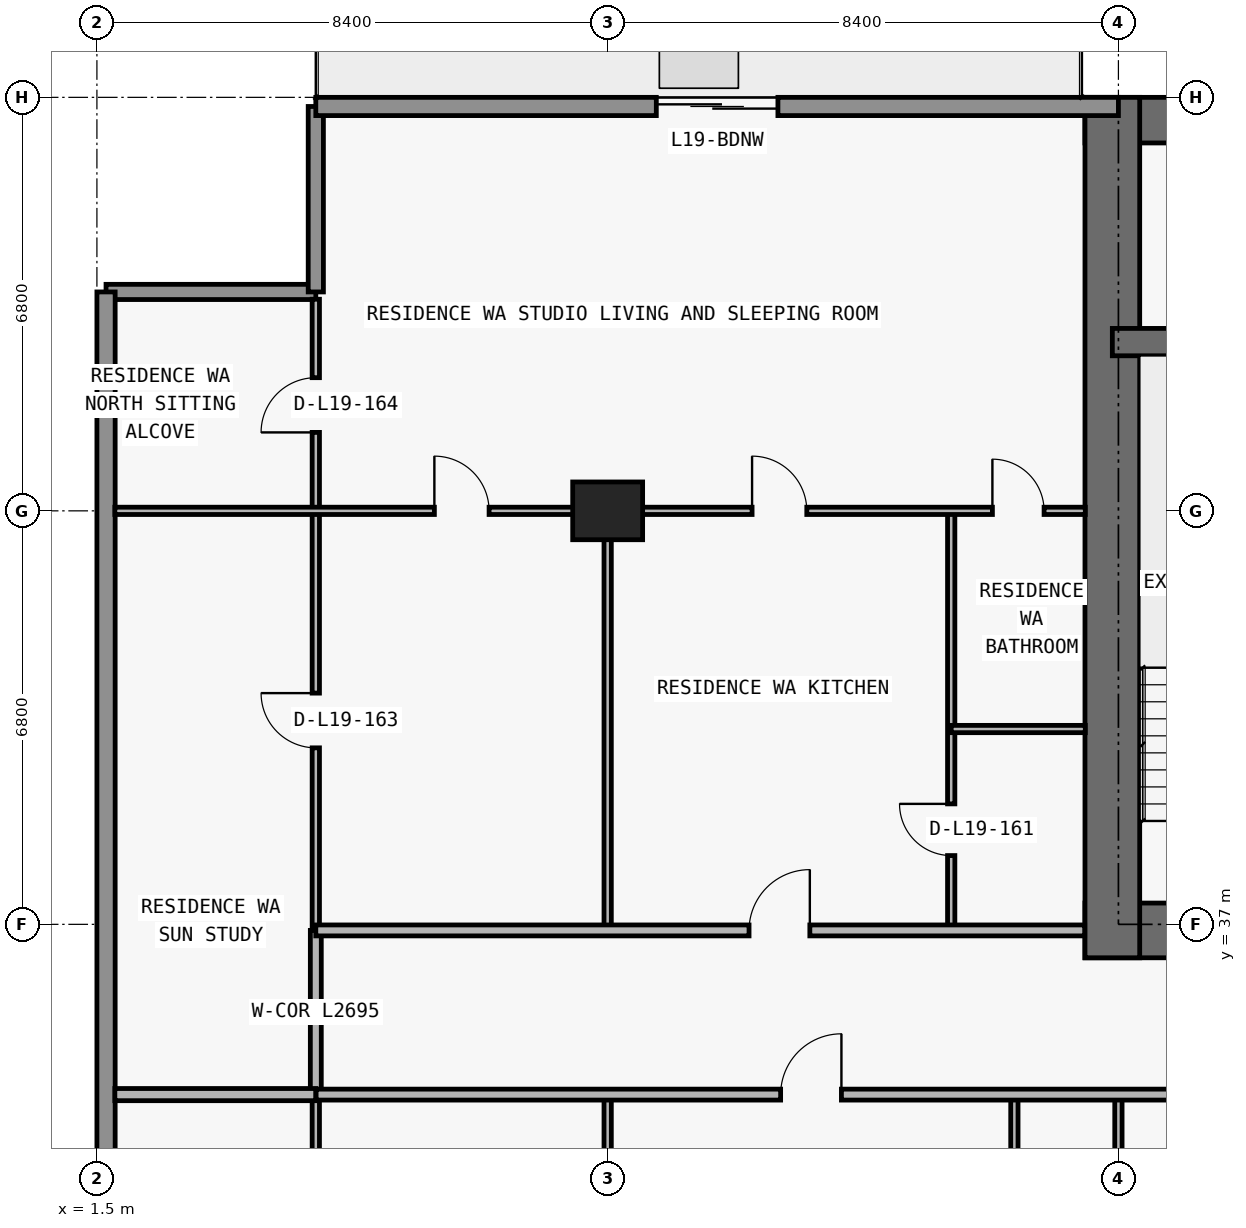
"""IFC4 building model, lengths in metres.
Left out: names, types, materials, properties, quantities, classifications, styles, units other than length and angle.
Written with IfcOpenShell. Run it as: python <this file> out.ifc"""

import sys

from ifc_helpers import new_model, si_unit, direction, frame, frame_2d, origin, origin_2d, place, context, subcontext, project, spatial, rectangle, extrude, element, fill, save


model = new_model("IFC4")
c1 = context("Model", 3, precision=1e-05, world=origin(), true_north=direction((0.0, 1.0)))
c2 = subcontext(c1, "Body", "Model", "MODEL_VIEW")
j1 = project(units=[si_unit("LENGTHUNIT", "METRE"), si_unit("PLANEANGLEUNIT", "RADIAN")], contexts=[c1])
p1 = place(None, origin())
s1 = spatial("IfcSite", under=j1, at=p1, CompositionType="ELEMENT")
p2 = place(p1, origin())
s2 = spatial("IfcBuilding", under=s1, at=p2, CompositionType="ELEMENT")
p3 = place(p2, frame((0.0, 0.0, 72.9)))
s3 = spatial("IfcBuildingStorey", under=s2, at=p3, CompositionType="ELEMENT", Elevation=72.9)
p4 = place(p3, frame((9.9, 43.8, 0.0), z_axis=(0.0, 0.0, 1.0), x_axis=(1.0, 0.0, 0.0)))
e1 = element("IfcColumn", 1, at=p4, inside=s3, PredefinedType="COLUMN", context=c2, shape_type="SweptSolid", body=[
    extrude(rectangle(XDim=1.15, YDim=0.95, at=origin_2d()), origin(), (0.0, 0.0, 1.0), 3.05),
])
p5 = place(p3, frame((17.75, 36.9, 0.0), z_axis=(0.0, 0.0, 1.0), x_axis=(1.0, 0.0, 0.0)))
e2 = element("IfcWall", 2, at=p5, inside=s3, PredefinedType="SHEAR", context=c2, shape_type="SweptSolid", body=[
    extrude(rectangle(XDim=42.3, YDim=0.9, at=frame_2d((21.15, 0.0))), origin(), (0.0, 0.0, 1.0), 3.05),
])
p6 = place(p5, frame((14.55, 0.0, 0.0)))
e3 = element("IfcOpeningElement", 3, at=p6, cuts=e2, PredefinedType="OPENING", context=c2, shape_type="SweptSolid", body=[
    extrude(rectangle(XDim=1.1, YDim=2.15, at=frame_2d((0.55, 1.075))), frame((0.0, 0.46, 0.0), z_axis=(0.0, -1.0, 0.0), x_axis=(1.0, 0.0, 0.0)), (0.0, 0.0, 1.0), 0.92),
])
p7 = place(p5, frame((6.4, 0.0, 0.0)))
e4 = element("IfcOpeningElement", 4, at=p7, cuts=e2, PredefinedType="OPENING", context=c2, shape_type="SweptSolid", body=[
    extrude(rectangle(XDim=1.05, YDim=2.15, at=frame_2d((0.525, 1.075))), frame((0.0, 0.46, 0.0), z_axis=(0.0, -1.0, 0.0), x_axis=(1.0, 0.0, 0.0)), (0.0, 0.0, 1.0), 0.92),
])
p8 = place(p5, frame((34.9, 0.0, 0.0)))
e5 = element("IfcOpeningElement", 5, at=p8, cuts=e2, PredefinedType="OPENING", context=c2, shape_type="SweptSolid", body=[
    extrude(rectangle(XDim=1.05, YDim=2.15, at=frame_2d((0.525, 1.075))), frame((0.0, 0.46, 0.0), z_axis=(0.0, -1.0, 0.0), x_axis=(1.0, 0.0, 0.0)), (0.0, 0.0, 1.0), 0.92),
])
p9 = place(p5, frame((11.012, 0.0, 0.0)))
e6 = element("IfcOpeningElement", 6, at=p9, cuts=e2, PredefinedType="OPENING", context=c2, shape_type="SweptSolid", body=[
    extrude(rectangle(XDim=1.05, YDim=2.15, at=frame_2d((0.525, 1.075))), frame((0.0, 0.46, 0.0), z_axis=(0.0, -1.0, 0.0), x_axis=(1.0, 0.0, 0.0)), (0.0, 0.0, 1.0), 0.92),
])
p10 = place(p5, frame((24.25, 0.0, 0.0)))
e7 = element("IfcOpeningElement", 7, at=p10, cuts=e2, PredefinedType="OPENING", context=c2, shape_type="SweptSolid", body=[
    extrude(rectangle(XDim=1.05, YDim=2.15, at=frame_2d((0.525, 1.075))), frame((0.0, 0.46, 0.0), z_axis=(0.0, -1.0, 0.0), x_axis=(1.0, 0.0, 0.0)), (0.0, 0.0, 1.0), 0.92),
])
p11 = place(p3, frame((17.75, 50.225, 0.0), z_axis=(0.0, 0.0, 1.0), x_axis=(1.0, 0.0, 0.0)))
e8 = element("IfcWall", 8, at=p11, inside=s3, PredefinedType="SHEAR", context=c2, shape_type="SweptSolid", body=[
    extrude(rectangle(XDim=42.3, YDim=0.75, at=frame_2d((21.15, 0.0))), origin(), (0.0, 0.0, 1.0), 3.05),
])
p12 = place(p3, frame((18.2, 36.45, 0.0), z_axis=(0.0, 0.0, 1.0), x_axis=(0.0, 1.0, 0.0)))
e9 = element("IfcWall", 9, at=p12, inside=s3, PredefinedType="SHEAR", context=c2, shape_type="SweptSolid", body=[
    extrude(rectangle(XDim=14.15, YDim=0.9, at=frame_2d((7.075, 0.0))), origin(), (0.0, 0.0, 1.0), 3.05),
])
p13 = place(p3, frame((18.2, 46.575, 0.0), z_axis=(0.0, 0.0, 1.0), x_axis=(1.0, 0.0, 0.0)))
e10 = element("IfcWall", 10, at=p13, inside=s3, PredefinedType="SHEAR", context=c2, shape_type="SweptSolid", body=[
    extrude(rectangle(XDim=41.4, YDim=0.45, at=frame_2d((20.7, 0.0))), origin(), (0.0, 0.0, 1.0), 3.05),
])
p14 = place(p13, frame((7.675, 0.0, 0.0)))
e11 = element("IfcOpeningElement", 11, at=p14, cuts=e10, PredefinedType="OPENING", context=c2, shape_type="SweptSolid", body=[
    extrude(rectangle(XDim=1.05, YDim=2.15, at=frame_2d((0.525, 1.075))), frame((0.0, 0.235, 0.0), z_axis=(0.0, -1.0, 0.0), x_axis=(1.0, 0.0, 0.0)), (0.0, 0.0, 1.0), 0.47),
])
p15 = place(p13, frame((32.725, 0.0, 0.0)))
e12 = element("IfcOpeningElement", 12, at=p15, cuts=e10, PredefinedType="OPENING", context=c2, shape_type="SweptSolid", body=[
    extrude(rectangle(XDim=1.05, YDim=2.15, at=frame_2d((0.525, 1.075))), frame((0.0, 0.235, 0.0), z_axis=(0.0, -1.0, 0.0), x_axis=(1.0, 0.0, 0.0)), (0.0, 0.0, 1.0), 0.47),
])
p16 = place(p3, frame((1.65, 47.4, 0.0), z_axis=(0.0, 0.0, 1.0), x_axis=(1.0, 0.0, 0.0)))
e13 = element("IfcWall", 13, at=p16, inside=s3, PredefinedType="ELEMENTEDWALL", context=c2, shape_type="SweptSolid", body=[
    extrude(rectangle(XDim=3.45, YDim=0.25, at=frame_2d((1.725, 0.0))), origin(), (0.0, 0.0, 1.0), 3.05),
])
p17 = place(p3, frame((5.1, 47.4, 0.0), z_axis=(0.0, 0.0, 1.0), x_axis=(0.0, 1.0, 0.0)))
e14 = element("IfcWall", 14, at=p17, inside=s3, PredefinedType="ELEMENTEDWALL", context=c2, shape_type="SweptSolid", body=[
    extrude(rectangle(XDim=3.05, YDim=0.25, at=frame_2d((1.525, 0.0))), origin(), (0.0, 0.0, 1.0), 3.05),
])
p18 = place(p3, frame((1.65, 26.8, 0.0), z_axis=(0.0, 0.0, 1.0), x_axis=(0.0, 1.0, 0.0)))
e15 = element("IfcWall", 15, at=p18, inside=s3, PredefinedType="STANDARD", context=c2, shape_type="SweptSolid", body=[
    extrude(rectangle(XDim=20.6, YDim=0.3, at=frame_2d((10.3, 0.0))), origin(), (0.0, 0.0, 1.0), 3.05),
])
p19 = place(p3, frame((5.1, 50.45, 0.0), z_axis=(0.0, 0.0, 1.0), x_axis=(1.0, 0.0, 0.0)))
e16 = element("IfcWall", 16, at=p19, inside=s3, PredefinedType="STANDARD", context=c2, shape_type="SweptSolid", body=[
    extrude(rectangle(XDim=13.2, YDim=0.3, at=frame_2d((6.6, 0.0))), origin(), (0.0, 0.0, 1.0), 3.05),
])
p20 = place(p19, frame((5.6, 0.0, 0.0)))
e17 = element("IfcOpeningElement", 17, at=p20, cuts=e16, PredefinedType="OPENING", context=c2, shape_type="SweptSolid", body=[
    extrude(rectangle(XDim=2.0, YDim=2.3, at=frame_2d((1.0, 1.15))), frame((0.0, 0.16, 0.0), z_axis=(0.0, -1.0, 0.0), x_axis=(1.0, 0.0, 0.0)), (0.0, 0.0, 1.0), 0.32),
])
p21 = place(p3, frame((5.1, 6.285, 0.0), z_axis=(0.0, 0.0, 1.0), x_axis=(0.0, 1.0, 0.0)))
e18 = element("IfcWall", 18, at=p21, inside=s3, PredefinedType="PARTITIONING", context=c2, shape_type="SweptSolid", body=[
    extrude(rectangle(XDim=27.915, YDim=0.12, at=frame_2d((13.958, 0.0))), origin(), (0.0, 0.0, 1.0), 3.05),
])
p22 = place(p21, frame((13.508, 0.0, 0.0)))
e19 = element("IfcOpeningElement", 19, at=p22, cuts=e18, PredefinedType="OPENING", context=c2, shape_type="SweptSolid", body=[
    extrude(rectangle(XDim=0.9, YDim=2.15, at=frame_2d((0.45, 1.075))), frame((0.0, 0.07, 0.0), z_axis=(0.0, -1.0, 0.0), x_axis=(1.0, 0.0, 0.0)), (0.0, 0.0, 1.0), 0.14),
])
p23 = place(p3, frame((5.1, 34.205, 0.0), z_axis=(0.0, 0.0, 1.0), x_axis=(0.0, 1.0, 0.0)))
e20 = element("IfcWall", 20, at=p23, inside=s3, PredefinedType="PARTITIONING", context=c2, shape_type="SweptSolid", body=[
    extrude(rectangle(XDim=2.695, YDim=0.18, at=frame_2d((1.347, 0.0))), origin(), (0.0, 0.0, 1.0), 3.05),
])
p24 = place(p3, frame((5.1, 36.905, 0.0), z_axis=(0.0, 0.0, 1.0), x_axis=(0.0, 1.0, 0.0)))
e21 = element("IfcWall", 21, at=p24, inside=s3, PredefinedType="PARTITIONING", context=c2, shape_type="SweptSolid", body=[
    extrude(rectangle(XDim=10.375, YDim=0.12, at=frame_2d((5.188, 0.0))), origin(), (0.0, 0.0, 1.0), 3.05),
])
p25 = place(p24, frame((2.998, 0.0, 0.0)))
e22 = element("IfcOpeningElement", 22, at=p25, cuts=e21, PredefinedType="OPENING", context=c2, shape_type="SweptSolid", body=[
    extrude(rectangle(XDim=0.9, YDim=2.15, at=frame_2d((0.45, 1.075))), frame((0.0, 0.07, 0.0), z_axis=(0.0, -1.0, 0.0), x_axis=(1.0, 0.0, 0.0)), (0.0, 0.0, 1.0), 0.14),
])
p26 = place(p24, frame((8.185, 0.0, 0.0)))
e23 = element("IfcOpeningElement", 23, at=p26, cuts=e21, PredefinedType="OPENING", context=c2, shape_type="SweptSolid", body=[
    extrude(rectangle(XDim=0.9, YDim=2.15, at=frame_2d((0.45, 1.075))), frame((0.0, 0.07, 0.0), z_axis=(0.0, -1.0, 0.0), x_axis=(1.0, 0.0, 0.0)), (0.0, 0.0, 1.0), 0.14),
])
p27 = place(p3, frame((9.9, 6.24, 0.0), z_axis=(0.0, 0.0, 1.0), x_axis=(0.0, 1.0, 0.0)))
e24 = element("IfcWall", 24, at=p27, inside=s3, PredefinedType="PARTITIONING", context=c2, shape_type="SweptSolid", body=[
    extrude(rectangle(XDim=27.96, YDim=0.12, at=frame_2d((13.98, 0.0))), origin(), (0.0, 0.0, 1.0), 2.11),
])
p28 = place(p27, frame((19.09, 0.0, 0.0)))
e25 = element("IfcOpeningElement", 25, at=p28, cuts=e24, PredefinedType="OPENING", context=c2, shape_type="SweptSolid", body=[
    extrude(rectangle(XDim=0.9, YDim=2.06, at=frame_2d((0.45, 1.03))), frame((0.0, 0.07, 0.0), z_axis=(0.0, -1.0, 0.0), x_axis=(1.0, 0.0, 0.0)), (0.0, 0.0, 1.0), 0.14),
])
p29 = place(p3, frame((9.9, 36.9, 0.0), z_axis=(0.0, 0.0, 1.0), x_axis=(0.0, 1.0, 0.0)))
e26 = element("IfcWall", 26, at=p29, inside=s3, PredefinedType="PARTITIONING", context=c2, shape_type="SweptSolid", body=[
    extrude(rectangle(XDim=6.9, YDim=0.12, at=frame_2d((3.45, 0.0))), origin(), (0.0, 0.0, 1.0), 2.11),
])
p30 = place(p3, frame((15.55, 36.9, 0.0), z_axis=(0.0, 0.0, 1.0), x_axis=(0.0, 1.0, 0.0)))
e27 = element("IfcWall", 27, at=p30, inside=s3, PredefinedType="PARTITIONING", context=c2, shape_type="SweptSolid", body=[
    extrude(rectangle(XDim=6.9, YDim=0.12, at=frame_2d((3.45, 0.0))), origin(), (0.0, 0.0, 1.0), 3.05),
])
p31 = place(p30, frame((1.231, 0.0, 0.0)))
e28 = element("IfcOpeningElement", 28, at=p31, cuts=e27, PredefinedType="OPENING", context=c2, shape_type="SweptSolid", body=[
    extrude(rectangle(XDim=0.85, YDim=2.1, at=frame_2d((0.425, 1.05))), frame((0.0, 0.07, 0.0), z_axis=(0.0, -1.0, 0.0), x_axis=(1.0, 0.0, 0.0)), (0.0, 0.0, 1.0), 0.14),
])
p32 = place(p3, frame((16.589, 28.18, 0.0), z_axis=(0.0, 0.0, 1.0), x_axis=(0.0, 1.0, 0.0)))
e29 = element("IfcWall", 29, at=p32, inside=s3, PredefinedType="PARTITIONING", context=c2, shape_type="SweptSolid", body=[
    extrude(rectangle(XDim=6.02, YDim=0.12, at=frame_2d((3.01, 0.0))), origin(), (0.0, 0.0, 1.0), 3.05),
])
p33 = place(p32, frame((2.585, 0.0, 0.0)))
e30 = element("IfcOpeningElement", 30, at=p33, cuts=e29, PredefinedType="OPENING", context=c2, shape_type="SweptSolid", body=[
    extrude(rectangle(XDim=0.85, YDim=2.1, at=frame_2d((0.425, 1.05))), frame((0.0, 0.07, 0.0), z_axis=(0.0, -1.0, 0.0), x_axis=(1.0, 0.0, 0.0)), (0.0, 0.0, 1.0), 0.14),
])
p34 = place(p3, frame((18.3, 6.24, 0.0), z_axis=(0.0, 0.0, 1.0), x_axis=(0.0, 1.0, 0.0)))
e31 = element("IfcWall", 31, at=p34, inside=s3, PredefinedType="PARTITIONING", context=c2, shape_type="SweptSolid", body=[
    extrude(rectangle(XDim=27.96, YDim=0.12, at=frame_2d((13.98, 0.0))), origin(), (0.0, 0.0, 1.0), 2.11),
])
p35 = place(p34, frame((19.09, 0.0, 0.0)))
e32 = element("IfcOpeningElement", 32, at=p35, cuts=e31, PredefinedType="OPENING", context=c2, shape_type="SweptSolid", body=[
    extrude(rectangle(XDim=0.9, YDim=2.06, at=frame_2d((0.45, 1.03))), frame((0.0, 0.07, 0.0), z_axis=(0.0, -1.0, 0.0), x_axis=(1.0, 0.0, 0.0)), (0.0, 0.0, 1.0), 0.14),
])
p36 = place(p3, frame((1.795, 34.2, 0.0), z_axis=(0.0, 0.0, 1.0), x_axis=(1.0, 0.0, 0.0)))
e33 = element("IfcWall", 33, at=p36, inside=s3, PredefinedType="PARTITIONING", context=c2, shape_type="SweptSolid", body=[
    extrude(rectangle(XDim=3.305, YDim=0.2, at=frame_2d((1.653, 0.0))), origin(), (0.0, 0.0, 1.0), 3.05),
])
p37 = place(p3, frame((5.105, 34.2, 0.0), z_axis=(0.0, 0.0, 1.0), x_axis=(1.0, 0.0, 0.0)))
e34 = element("IfcWall", 34, at=p37, inside=s3, PredefinedType="PARTITIONING", context=c2, shape_type="SweptSolid", body=[
    extrude(rectangle(XDim=67.595, YDim=0.18, at=frame_2d((33.797, 0.0))), origin(), (0.0, 0.0, 1.0), 3.05),
])
p38 = place(p37, frame((7.639, 0.0, 0.0)))
e35 = element("IfcOpeningElement", 35, at=p38, cuts=e34, PredefinedType="OPENING", context=c2, shape_type="SweptSolid", body=[
    extrude(rectangle(XDim=1.0, YDim=2.2, at=frame_2d((0.5, 1.1))), frame((0.0, 0.1, 0.0), z_axis=(0.0, -1.0, 0.0), x_axis=(1.0, 0.0, 0.0)), (0.0, 0.0, 1.0), 0.2),
])
p39 = place(p37, frame((24.423, 0.0, 0.0)))
e36 = element("IfcOpeningElement", 36, at=p39, cuts=e34, PredefinedType="OPENING", context=c2, shape_type="SweptSolid", body=[
    extrude(rectangle(XDim=1.0, YDim=2.2, at=frame_2d((0.5, 1.1))), frame((0.0, 0.1, 0.0), z_axis=(0.0, -1.0, 0.0), x_axis=(1.0, 0.0, 0.0)), (0.0, 0.0, 1.0), 0.2),
])
p40 = place(p37, frame((48.825, 0.0, 0.0)))
e37 = element("IfcOpeningElement", 37, at=p40, cuts=e34, PredefinedType="OPENING", context=c2, shape_type="SweptSolid", body=[
    extrude(rectangle(XDim=1.0, YDim=2.2, at=frame_2d((0.5, 1.1))), frame((0.0, 0.1, 0.0), z_axis=(0.0, -1.0, 0.0), x_axis=(1.0, 0.0, 0.0)), (0.0, 0.0, 1.0), 0.2),
])
p41 = place(p3, frame((5.1, 36.9, 0.0), z_axis=(0.0, 0.0, 1.0), x_axis=(1.0, 0.0, 0.0)))
e38 = element("IfcWall", 38, at=p41, inside=s3, PredefinedType="PARTITIONING", context=c2, shape_type="SweptSolid", body=[
    extrude(rectangle(XDim=12.645, YDim=0.18, at=frame_2d((6.323, 0.0))), origin(), (0.0, 0.0, 1.0), 3.05),
])
p42 = place(p41, frame((7.125, 0.0, 0.0)))
e39 = element("IfcOpeningElement", 39, at=p42, cuts=e38, PredefinedType="OPENING", context=c2, shape_type="SweptSolid", body=[
    extrude(rectangle(XDim=1.0, YDim=2.2, at=frame_2d((0.5, 1.1))), frame((0.0, 0.1, 0.0), z_axis=(0.0, -1.0, 0.0), x_axis=(1.0, 0.0, 0.0)), (0.0, 0.0, 1.0), 0.2),
])
p43 = place(p3, frame((15.55, 40.212, 0.0), z_axis=(0.0, 0.0, 1.0), x_axis=(1.0, 0.0, 0.0)))
e40 = element("IfcWall", 40, at=p43, inside=s3, PredefinedType="PARTITIONING", context=c2, shape_type="SweptSolid", body=[
    extrude(rectangle(XDim=2.205, YDim=0.12, at=frame_2d((1.103, 0.0))), origin(), (0.0, 0.0, 1.0), 3.05),
])
p44 = place(p3, frame((1.795, 43.8, 0.0), z_axis=(0.0, 0.0, 1.0), x_axis=(1.0, 0.0, 0.0)))
e41 = element("IfcWall", 41, at=p44, inside=s3, PredefinedType="PARTITIONING", context=c2, shape_type="SweptSolid", body=[
    extrude(rectangle(XDim=15.96, YDim=0.12, at=frame_2d((7.98, 0.0))), origin(), (0.0, 0.0, 1.0), 2.339),
])
p45 = place(p44, frame((5.255, 0.0, 0.0)))
e42 = element("IfcOpeningElement", 42, at=p45, cuts=e41, PredefinedType="OPENING", context=c2, shape_type="SweptSolid", body=[
    extrude(rectangle(XDim=0.9, YDim=2.15, at=frame_2d((0.45, 1.075))), frame((0.0, 0.07, 0.0), z_axis=(0.0, -1.0, 0.0), x_axis=(1.0, 0.0, 0.0)), (0.0, 0.0, 1.0), 0.14),
])
p46 = place(p44, frame((10.48, 0.0, 0.0)))
e43 = element("IfcOpeningElement", 43, at=p46, cuts=e41, PredefinedType="OPENING", context=c2, shape_type="SweptSolid", body=[
    extrude(rectangle(XDim=0.9, YDim=2.15, at=frame_2d((0.45, 1.075))), frame((0.0, 0.07, 0.0), z_axis=(0.0, -1.0, 0.0), x_axis=(1.0, 0.0, 0.0)), (0.0, 0.0, 1.0), 0.14),
])
p47 = place(p44, frame((14.433, 0.0, 0.0)))
e44 = element("IfcOpeningElement", 44, at=p47, cuts=e41, PredefinedType="OPENING", context=c2, shape_type="SweptSolid", body=[
    extrude(rectangle(XDim=0.85, YDim=2.1, at=frame_2d((0.425, 1.05))), frame((0.0, 0.07, 0.0), z_axis=(0.0, -1.0, 0.0), x_axis=(1.0, 0.0, 0.0)), (0.0, 0.0, 1.0), 0.14),
])
p48 = place(p20, origin())
e45 = element("IfcDoor", 45, at=p48, inside=s3, OperationType="DOUBLE_DOOR_SLIDING", PredefinedType="DOOR", context=c2, shape_type="SweptSolid", body=[
    extrude(rectangle(XDim=2.0, YDim=2.3, at=frame_2d((1.0, 1.15))), frame((0.0, 0.025, 0.0), z_axis=(0.0, -1.0, 0.0), x_axis=(1.0, 0.0, 0.0)), (0.0, 0.0, 1.0), 0.05),
])
fill(e17, e45)
p49 = place(p38, origin())
e46 = element("IfcDoor", 46, at=p49, inside=s3, OperationType="SINGLE_SWING_RIGHT", PredefinedType="DOOR", context=c2, shape_type="SweptSolid", body=[
    extrude(rectangle(XDim=1.0, YDim=2.2, at=frame_2d((0.5, 1.1))), frame((0.0, 0.025, 0.0), z_axis=(0.0, -1.0, 0.0), x_axis=(1.0, 0.0, 0.0)), (0.0, 0.0, 1.0), 0.05),
])
fill(e35, e46)
p50 = place(p45, origin())
e47 = element("IfcDoor", 47, at=p50, inside=s3, OperationType="SINGLE_SWING_LEFT", PredefinedType="DOOR", context=c2, shape_type="SweptSolid", body=[
    extrude(rectangle(XDim=0.9, YDim=2.15, at=frame_2d((0.45, 1.075))), frame((0.0, 0.025, 0.0), z_axis=(0.0, -1.0, 0.0), x_axis=(1.0, 0.0, 0.0)), (0.0, 0.0, 1.0), 0.05),
])
fill(e42, e47)
p51 = place(p42, origin())
e48 = element("IfcDoor", 48, at=p51, inside=s3, OperationType="SINGLE_SWING_RIGHT", PredefinedType="DOOR", context=c2, shape_type="SweptSolid", body=[
    extrude(rectangle(XDim=1.0, YDim=2.2, at=frame_2d((0.5, 1.1))), frame((0.0, 0.025, 0.0), z_axis=(0.0, -1.0, 0.0), x_axis=(1.0, 0.0, 0.0)), (0.0, 0.0, 1.0), 0.05),
])
fill(e39, e48)
p52 = place(p46, origin())
e49 = element("IfcDoor", 49, at=p52, inside=s3, OperationType="SINGLE_SWING_LEFT", PredefinedType="DOOR", context=c2, shape_type="SweptSolid", body=[
    extrude(rectangle(XDim=0.9, YDim=2.15, at=frame_2d((0.45, 1.075))), frame((0.0, 0.025, 0.0), z_axis=(0.0, -1.0, 0.0), x_axis=(1.0, 0.0, 0.0)), (0.0, 0.0, 1.0), 0.05),
])
fill(e43, e49)
p53 = place(p31, origin())
e50 = element("IfcDoor", 50, at=p53, inside=s3, OperationType="SINGLE_SWING_RIGHT", PredefinedType="DOOR", context=c2, shape_type="SweptSolid", body=[
    extrude(rectangle(XDim=0.85, YDim=2.1, at=frame_2d((0.425, 1.05))), frame((0.0, 0.025, 0.0), z_axis=(0.0, -1.0, 0.0), x_axis=(1.0, 0.0, 0.0)), (0.0, 0.0, 1.0), 0.05),
])
fill(e28, e50)
p54 = place(p47, origin())
e51 = element("IfcDoor", 51, at=p54, inside=s3, OperationType="SINGLE_SWING_LEFT", PredefinedType="DOOR", context=c2, shape_type="SweptSolid", body=[
    extrude(rectangle(XDim=0.85, YDim=2.1, at=frame_2d((0.425, 1.05))), frame((0.0, 0.025, 0.0), z_axis=(0.0, -1.0, 0.0), x_axis=(1.0, 0.0, 0.0)), (0.0, 0.0, 1.0), 0.05),
])
fill(e44, e51)
p55 = place(p25, origin())
e52 = element("IfcDoor", 52, at=p55, inside=s3, OperationType="SINGLE_SWING_RIGHT", PredefinedType="DOOR", context=c2, shape_type="SweptSolid", body=[
    extrude(rectangle(XDim=0.9, YDim=2.15, at=frame_2d((0.45, 1.075))), frame((0.0, 0.025, 0.0), z_axis=(0.0, -1.0, 0.0), x_axis=(1.0, 0.0, 0.0)), (0.0, 0.0, 1.0), 0.05),
])
fill(e22, e52)
p56 = place(p26, origin())
e53 = element("IfcDoor", 53, at=p56, inside=s3, OperationType="SINGLE_SWING_LEFT", PredefinedType="DOOR", context=c2, shape_type="SweptSolid", body=[
    extrude(rectangle(XDim=0.9, YDim=2.15, at=frame_2d((0.45, 1.075))), frame((0.0, 0.025, 0.0), z_axis=(0.0, -1.0, 0.0), x_axis=(1.0, 0.0, 0.0)), (0.0, 0.0, 1.0), 0.05),
])
fill(e23, e53)
save(model, sys.argv[1])
